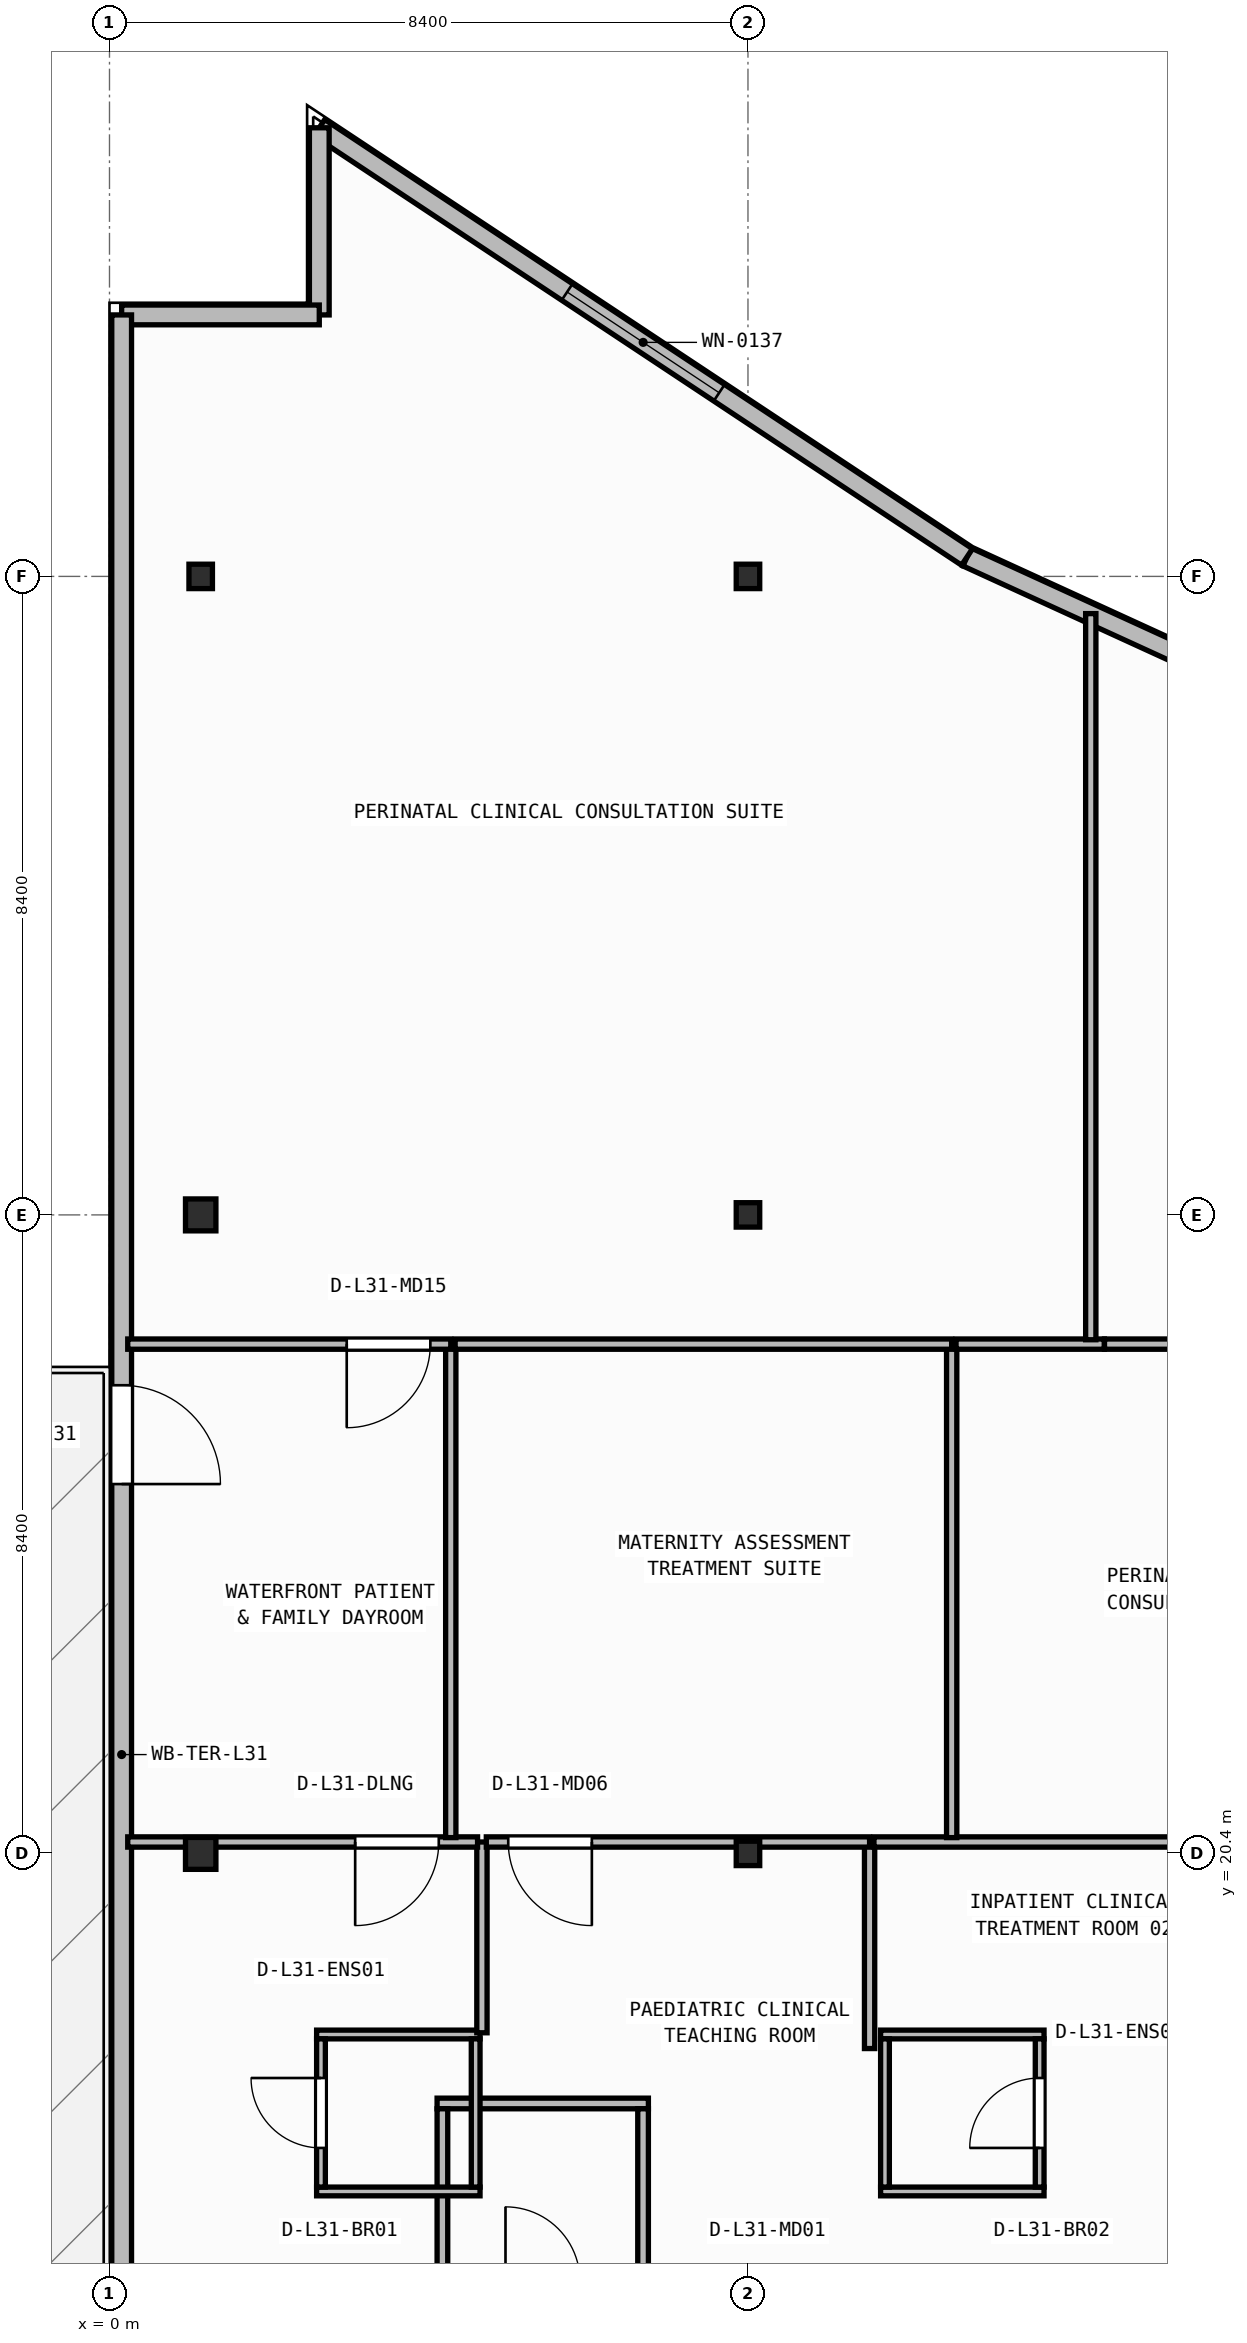
"""IFC4 building model, lengths in metres.
Left out: names, types, materials, properties, quantities, classifications, styles, units other than length and angle.
Written with IfcOpenShell. Run it as: python <this file> out.ifc"""

import sys

from ifc_helpers import new_model, si_unit, direction, frame, frame_2d, origin, origin_2d, place, context, subcontext, project, spatial, rectangle, i_section, extrude, element, fill, save


model = new_model("IFC4")
c1 = context("Model", 3, precision=1e-05, world=origin(), true_north=direction((0.0, 1.0)))
c2 = subcontext(c1, "Body", "Model", "MODEL_VIEW")
j1 = project(units=[si_unit("LENGTHUNIT", "METRE"), si_unit("PLANEANGLEUNIT", "RADIAN")], contexts=[c1])
p1 = place(None, origin())
s1 = spatial("IfcSite", under=j1, at=p1, CompositionType="ELEMENT")
p2 = place(p1, origin())
s2 = spatial("IfcBuilding", under=s1, at=p2, CompositionType="ELEMENT")
p3 = place(p2, frame((0.0, 0.0, 127.05)))
s3 = spatial("IfcBuildingStorey", under=s2, at=p3, CompositionType="ELEMENT", Elevation=127.05)
p4 = place(p3, frame((1.2, 20.4, 0.0), z_axis=(0.0, 0.0, 1.0), x_axis=(1.0, 0.0, 0.0)))
e1 = element("IfcColumn", 1, at=p4, inside=s3, PredefinedType="COLUMN", context=c2, shape_type="SweptSolid", body=[
    extrude(i_section(OverallWidth=0.4, OverallDepth=0.42, WebThickness=0.025, FlangeThickness=0.04, at=origin_2d()), origin(), (0.0, 0.0, 1.0), 3.95),
])
p5 = place(p3, frame((8.4, 20.4, 0.0), z_axis=(0.0, 0.0, 1.0), x_axis=(1.0, 0.0, 0.0)))
e2 = element("IfcColumn", 2, at=p5, inside=s3, PredefinedType="COLUMN", context=c2, shape_type="SweptSolid", body=[
    extrude(i_section(OverallWidth=0.309, OverallDepth=0.321, WebThickness=0.014, FlangeThickness=0.022, FilletRadius=0.017, at=origin_2d()), origin(), (0.0, 0.0, 1.0), 3.95),
])
p6 = place(p3, frame((1.2, 28.8, 0.0), z_axis=(0.0, 0.0, 1.0), x_axis=(1.0, 0.0, 0.0)))
e3 = element("IfcColumn", 3, at=p6, inside=s3, PredefinedType="COLUMN", context=c2, shape_type="SweptSolid", body=[
    extrude(i_section(OverallWidth=0.4, OverallDepth=0.42, WebThickness=0.025, FlangeThickness=0.04, at=origin_2d()), origin(), (0.0, 0.0, 1.0), 3.95),
])
for number, where, z_axis, x_axis in (
    (4, (8.4, 28.8, 0.0), (0.0, 0.0, 1.0), (1.0, 0.0, 0.0)),
    (5, (1.2, 37.2, 0.0), (0.0, 0.0, 1.0), (1.0, 0.0, 0.0)),
    (6, (8.4, 37.2, 0.0), (0.0, 0.0, 1.0), (1.0, 0.0, 0.0)),
):
    element("IfcColumn", number, at=place(p3, frame(where, z_axis=z_axis, x_axis=x_axis)), inside=s3, PredefinedType="COLUMN", context=c2, shape_type="SweptSolid", body=[
        extrude(i_section(OverallWidth=0.309, OverallDepth=0.321, WebThickness=0.014, FlangeThickness=0.022, FilletRadius=0.017, at=origin_2d()), origin(), (0.0, 0.0, 1.0), 3.95),
    ])
p7 = place(p3, frame((23.818, 31.716, 0.0), z_axis=(0.0, 0.0, 1.0), x_axis=(-0.909209527513, 0.416338846471, 0.0)))
e7 = element("IfcWall", 7, at=p7, inside=s3, PredefinedType="STANDARD", context=c2, shape_type="SweptSolid", body=[
    extrude(rectangle(XDim=13.787, YDim=0.26, at=frame_2d((6.894, 0.0))), origin(), (0.0, 0.0, 1.0), 3.71),
])
p8 = place(p7, frame((5.694, 0.0, 0.9)))
e8 = element("IfcOpeningElement", 8, at=p8, cuts=e7, PredefinedType="OPENING", context=c2, shape_type="SweptSolid", body=[
    extrude(rectangle(XDim=2.4, YDim=1.65, at=frame_2d((1.2, 0.825))), frame((0.0, 0.14, 0.0), z_axis=(0.0, -1.0, 0.0), x_axis=(1.0, 0.0, 0.0)), (0.0, 0.0, 1.0), 0.28),
])
p9 = place(p3, frame((11.282, 37.456, 0.0), z_axis=(0.0, 0.0, 1.0), x_axis=(-0.833630474253, 0.552322580017, 0.0)))
e9 = element("IfcWall", 9, at=p9, inside=s3, PredefinedType="STANDARD", context=c2, shape_type="SweptSolid", body=[
    extrude(rectangle(XDim=10.223, YDim=0.26, at=frame_2d((5.111, 0.0))), origin(), (0.0, 0.0, 1.0), 3.71),
])
p10 = place(p9, frame((3.911, 0.0, 0.9)))
e10 = element("IfcOpeningElement", 10, at=p10, cuts=e9, PredefinedType="OPENING", context=c2, shape_type="SweptSolid", body=[
    extrude(rectangle(XDim=2.4, YDim=1.65, at=frame_2d((1.2, 0.825))), frame((0.0, 0.14, 0.0), z_axis=(0.0, -1.0, 0.0), x_axis=(1.0, 0.0, 0.0)), (0.0, 0.0, 1.0), 0.28),
])
p11 = place(p3, frame((2.76, 43.102, 0.0), z_axis=(0.0, 0.0, 1.0), x_axis=(0.0, -1.0, 0.0)))
e11 = element("IfcWall", 11, at=p11, inside=s3, PredefinedType="STANDARD", context=c2, shape_type="SweptSolid", body=[
    extrude(rectangle(XDim=2.462, YDim=0.26, at=frame_2d((1.231, 0.0))), origin(), (0.0, 0.0, 1.0), 3.71),
])
p12 = place(p3, frame((2.76, 40.64, 0.0), z_axis=(0.0, 0.0, 1.0), x_axis=(-1.0, 0.0, 0.0)))
e12 = element("IfcWall", 12, at=p12, inside=s3, PredefinedType="STANDARD", context=c2, shape_type="SweptSolid", body=[
    extrude(rectangle(XDim=2.6, YDim=0.26, at=frame_2d((1.3, 0.0))), origin(), (0.0, 0.0, 1.0), 3.71),
])
p13 = place(p3, frame((0.16, 40.64, 0.0), z_axis=(0.0, 0.0, 1.0), x_axis=(0.0, -1.0, 0.0)))
e13 = element("IfcWall", 13, at=p13, inside=s3, PredefinedType="STANDARD", context=c2, shape_type="SweptSolid", body=[
    extrude(rectangle(XDim=37.88, YDim=0.26, at=frame_2d((18.94, 0.0))), origin(), (0.0, 0.0, 1.0), 3.71),
])
p14 = place(p13, frame((14.081, 0.0, 0.0)))
e14 = element("IfcOpeningElement", 14, at=p14, cuts=e13, PredefinedType="OPENING", context=c2, shape_type="SweptSolid", body=[
    extrude(rectangle(XDim=1.3, YDim=2.15, at=frame_2d((0.65, 1.075))), frame((0.0, 0.14, 0.0), z_axis=(0.0, -1.0, 0.0), x_axis=(1.0, 0.0, 0.0)), (0.0, 0.0, 1.0), 0.28),
])
p15 = place(p3, frame((4.31, 17.11, 0.0), z_axis=(0.0, 0.0, 1.0), x_axis=(1.0, 0.0, 0.0)))
e15 = element("IfcWall", 15, at=p15, inside=s3, PredefinedType="PARTITIONING", context=c2, shape_type="SweptSolid", body=[
    extrude(rectangle(XDim=2.78, YDim=0.14, at=frame_2d((1.39, 0.0))), origin(), (0.0, 0.0, 1.0), 3.71),
])
for number, where, z_axis, x_axis in (
    (16, (4.38, 14.84, 0.0), (0.0, 0.0, 1.0), (0.0, 1.0, 0.0)),
    (17, (7.02, 14.84, 0.0), (0.0, 0.0, 1.0), (0.0, 1.0, 0.0)),
):
    element("IfcWall", number, at=place(p3, frame(where, z_axis=z_axis, x_axis=x_axis)), inside=s3, PredefinedType="PARTITIONING", context=c2, shape_type="SweptSolid", body=[
        extrude(rectangle(XDim=2.2, YDim=0.14, at=frame_2d((1.1, 0.0))), origin(), (0.0, 0.0, 1.0), 3.71),
    ])
for number, where, z_axis, x_axis in (
    (18, (2.725, 15.952, 0.0), (0.0, 0.0, 1.0), (1.0, 0.0, 0.0)),
    (19, (2.725, 18.018, 0.0), (0.0, 0.0, 1.0), (1.0, 0.0, 0.0)),
):
    element("IfcWall", number, at=place(p3, frame(where, z_axis=z_axis, x_axis=x_axis)), inside=s3, PredefinedType="PARTITIONING", context=c2, shape_type="SweptSolid", body=[
        extrude(rectangle(XDim=2.15, YDim=0.115, at=frame_2d((1.075, 0.0))), origin(), (0.0, 0.0, 1.0), 3.71),
    ])
p16 = place(p3, frame((2.782, 16.01, 0.0), z_axis=(0.0, 0.0, 1.0), x_axis=(0.0, 1.0, 0.0)))
e20 = element("IfcWall", 20, at=p16, inside=s3, PredefinedType="PARTITIONING", context=c2, shape_type="SweptSolid", body=[
    extrude(rectangle(XDim=1.95, YDim=0.115, at=frame_2d((0.975, 0.0))), origin(), (0.0, 0.0, 1.0), 3.71),
])
p17 = place(p16, frame((0.515, 0.0, 0.0)))
e21 = element("IfcOpeningElement", 21, at=p17, cuts=e20, PredefinedType="OPENING", context=c2, shape_type="SweptSolid", body=[
    extrude(rectangle(XDim=0.92, YDim=2.1, at=frame_2d((0.46, 1.05))), frame((0.0, 0.067, 0.0), z_axis=(0.0, -1.0, 0.0), x_axis=(1.0, 0.0, 0.0)), (0.0, 0.0, 1.0), 0.135),
])
p18 = place(p3, frame((4.817, 16.01, 0.0), z_axis=(0.0, 0.0, 1.0), x_axis=(0.0, 1.0, 0.0)))
e22 = element("IfcWall", 22, at=p18, inside=s3, PredefinedType="PARTITIONING", context=c2, shape_type="SweptSolid", body=[
    extrude(rectangle(XDim=1.95, YDim=0.115, at=frame_2d((0.975, 0.0))), origin(), (0.0, 0.0, 1.0), 3.71),
])
for number, where, z_axis, x_axis in (
    (23, (10.145, 15.952, 0.0), (0.0, 0.0, 1.0), (1.0, 0.0, 0.0)),
    (24, (10.145, 18.018, 0.0), (0.0, 0.0, 1.0), (1.0, 0.0, 0.0)),
):
    element("IfcWall", number, at=place(p3, frame(where, z_axis=z_axis, x_axis=x_axis)), inside=s3, PredefinedType="PARTITIONING", context=c2, shape_type="SweptSolid", body=[
        extrude(rectangle(XDim=2.15, YDim=0.115, at=frame_2d((1.075, 0.0))), origin(), (0.0, 0.0, 1.0), 3.71),
    ])
p19 = place(p3, frame((10.202, 16.01, 0.0), z_axis=(0.0, 0.0, 1.0), x_axis=(0.0, 1.0, 0.0)))
e25 = element("IfcWall", 25, at=p19, inside=s3, PredefinedType="PARTITIONING", context=c2, shape_type="SweptSolid", body=[
    extrude(rectangle(XDim=1.95, YDim=0.115, at=frame_2d((0.975, 0.0))), origin(), (0.0, 0.0, 1.0), 3.71),
])
p20 = place(p3, frame((12.238, 16.01, 0.0), z_axis=(0.0, 0.0, 1.0), x_axis=(0.0, 1.0, 0.0)))
e26 = element("IfcWall", 26, at=p20, inside=s3, PredefinedType="PARTITIONING", context=c2, shape_type="SweptSolid", body=[
    extrude(rectangle(XDim=1.95, YDim=0.115, at=frame_2d((0.975, 0.0))), origin(), (0.0, 0.0, 1.0), 3.71),
])
p21 = place(p20, frame((0.515, 0.0, 0.0)))
e27 = element("IfcOpeningElement", 27, at=p21, cuts=e26, PredefinedType="OPENING", context=c2, shape_type="SweptSolid", body=[
    extrude(rectangle(XDim=0.92, YDim=2.1, at=frame_2d((0.46, 1.05))), frame((0.0, 0.067, 0.0), z_axis=(0.0, -1.0, 0.0), x_axis=(1.0, 0.0, 0.0)), (0.0, 0.0, 1.0), 0.135),
])
p22 = place(p3, frame((4.9, 18.04, 0.0), z_axis=(0.0, 0.0, 1.0), x_axis=(0.0, 1.0, 0.0)))
e28 = element("IfcWall", 28, at=p22, inside=s3, PredefinedType="PARTITIONING", context=c2, shape_type="SweptSolid", body=[
    extrude(rectangle(XDim=2.51, YDim=0.135, at=frame_2d((1.255, 0.0))), origin(), (0.0, 0.0, 1.0), 3.71),
])
p23 = place(p3, frame((4.843, 20.55, 0.0), z_axis=(0.0, 0.0, 1.0), x_axis=(-1.0, 0.0, 0.0)))
e29 = element("IfcWall", 29, at=p23, inside=s3, PredefinedType="PARTITIONING", context=c2, shape_type="SweptSolid", body=[
    extrude(rectangle(XDim=4.603, YDim=0.135, at=frame_2d((2.301, 0.0))), origin(), (0.0, 0.0, 1.0), 3.083),
])
p24 = place(p23, frame((0.51, 0.0, 0.0)))
e30 = element("IfcOpeningElement", 30, at=p24, cuts=e29, PredefinedType="OPENING", context=c2, shape_type="SweptSolid", body=[
    extrude(rectangle(XDim=1.1, YDim=2.1, at=frame_2d((0.55, 1.05))), frame((0.0, 0.077, 0.0), z_axis=(0.0, -1.0, 0.0), x_axis=(1.0, 0.0, 0.0)), (0.0, 0.0, 1.0), 0.155),
])
p25 = place(p3, frame((10.0, 17.833, 0.0), z_axis=(0.0, 0.0, 1.0), x_axis=(0.0, 1.0, 0.0)))
e31 = element("IfcWall", 31, at=p25, inside=s3, PredefinedType="PARTITIONING", context=c2, shape_type="SweptSolid", body=[
    extrude(rectangle(XDim=2.718, YDim=0.135, at=frame_2d((1.359, 0.0))), origin(), (0.0, 0.0, 1.0), 3.71),
])
p26 = place(p3, frame((10.0, 20.55, 0.0), z_axis=(0.0, 0.0, 1.0), x_axis=(-1.0, 0.0, 0.0)))
e32 = element("IfcWall", 32, at=p26, inside=s3, PredefinedType="PARTITIONING", context=c2, shape_type="SweptSolid", body=[
    extrude(rectangle(XDim=5.042, YDim=0.135, at=frame_2d((2.521, 0.0))), origin(), (0.0, 0.0, 1.0), 3.083),
])
p27 = place(p26, frame((3.654, 0.0, 0.0)))
e33 = element("IfcOpeningElement", 33, at=p27, cuts=e32, PredefinedType="OPENING", context=c2, shape_type="SweptSolid", body=[
    extrude(rectangle(XDim=1.1, YDim=2.1, at=frame_2d((0.55, 1.05))), frame((0.0, 0.077, 0.0), z_axis=(0.0, -1.0, 0.0), x_axis=(1.0, 0.0, 0.0)), (0.0, 0.0, 1.0), 0.155),
])
p28 = place(p3, frame((14.34, 20.55, 0.0), z_axis=(0.0, 0.0, 1.0), x_axis=(-1.0, 0.0, 0.0)))
e34 = element("IfcWall", 34, at=p28, inside=s3, PredefinedType="PARTITIONING", context=c2, shape_type="SweptSolid", body=[
    extrude(rectangle(XDim=4.282, YDim=0.135, at=frame_2d((2.141, 0.0))), origin(), (0.0, 0.0, 1.0), 3.083),
])
p29 = place(p3, frame((4.49, 20.607, 0.0), z_axis=(0.0, 0.0, 1.0), x_axis=(0.0, 1.0, 0.0)))
e35 = element("IfcWall", 35, at=p29, inside=s3, PredefinedType="PARTITIONING", context=c2, shape_type="SweptSolid", body=[
    extrude(rectangle(XDim=6.493, YDim=0.135, at=frame_2d((3.246, 0.0))), origin(), (0.0, 0.0, 1.0), 3.71),
])
p30 = place(p3, frame((4.49, 27.1, 0.0), z_axis=(0.0, 0.0, 1.0), x_axis=(-1.0, 0.0, 0.0)))
e36 = element("IfcWall", 36, at=p30, inside=s3, PredefinedType="PARTITIONING", context=c2, shape_type="SweptSolid", body=[
    extrude(rectangle(XDim=4.25, YDim=0.135, at=frame_2d((2.125, 0.0))), origin(), (0.0, 0.0, 1.0), 3.71),
])
p31 = place(p30, frame((0.269, 0.0, 0.0)))
e37 = element("IfcOpeningElement", 37, at=p31, cuts=e36, PredefinedType="OPENING", context=c2, shape_type="SweptSolid", body=[
    extrude(rectangle(XDim=1.1, YDim=2.1, at=frame_2d((0.55, 1.05))), frame((0.0, 0.077, 0.0), z_axis=(0.0, -1.0, 0.0), x_axis=(1.0, 0.0, 0.0)), (0.0, 0.0, 1.0), 0.155),
])
p32 = place(p3, frame((11.08, 20.607, 0.0), z_axis=(0.0, 0.0, 1.0), x_axis=(0.0, 1.0, 0.0)))
e38 = element("IfcWall", 38, at=p32, inside=s3, PredefinedType="PARTITIONING", context=c2, shape_type="SweptSolid", body=[
    extrude(rectangle(XDim=6.493, YDim=0.135, at=frame_2d((3.246, 0.0))), origin(), (0.0, 0.0, 1.0), 3.71),
])
p33 = place(p3, frame((11.08, 27.1, 0.0), z_axis=(0.0, 0.0, 1.0), x_axis=(-1.0, 0.0, 0.0)))
e39 = element("IfcWall", 39, at=p33, inside=s3, PredefinedType="PARTITIONING", context=c2, shape_type="SweptSolid", body=[
    extrude(rectangle(XDim=6.532, YDim=0.135, at=frame_2d((3.266, 0.0))), origin(), (0.0, 0.0, 1.0), 3.71),
])
p34 = place(p3, frame((13.088, 27.1, 0.0), z_axis=(0.0, 0.0, 1.0), x_axis=(-1.0, 0.0, 0.0)))
e40 = element("IfcWall", 40, at=p34, inside=s3, PredefinedType="PARTITIONING", context=c2, shape_type="SweptSolid", body=[
    extrude(rectangle(XDim=1.951, YDim=0.135, at=frame_2d((0.976, 0.0))), origin(), (0.0, 0.0, 1.0), 3.71),
])
p35 = place(p3, frame((19.12, 27.1, 0.0), z_axis=(0.0, 0.0, 1.0), x_axis=(-1.0, 0.0, 0.0)))
e41 = element("IfcWall", 41, at=p35, inside=s3, PredefinedType="PARTITIONING", context=c2, shape_type="SweptSolid", body=[
    extrude(rectangle(XDim=6.03, YDim=0.135, at=frame_2d((3.015, 0.0))), origin(), (0.0, 0.0, 1.0), 3.71),
])
p36 = place(p3, frame((12.91, 27.157, 0.0), z_axis=(0.0, 0.0, 1.0), x_axis=(0.0, 1.0, 0.0)))
e42 = element("IfcWall", 42, at=p36, inside=s3, PredefinedType="PARTITIONING", context=c2, shape_type="SweptSolid", body=[
    extrude(rectangle(XDim=9.553, YDim=0.135, at=frame_2d((4.776, 0.0))), origin(), (0.0, 0.0, 1.0), 3.71),
])
p37 = place(p10, origin())
e43 = element("IfcWindow", 43, at=p37, inside=s3, PartitioningType="SINGLE_PANEL", PredefinedType="WINDOW", context=c2, shape_type="SweptSolid", body=[
    extrude(rectangle(XDim=2.4, YDim=1.65, at=frame_2d((1.2, 0.825))), frame((0.0, 0.03, 0.0), z_axis=(0.0, -1.0, 0.0), x_axis=(1.0, 0.0, 0.0)), (0.0, 0.0, 1.0), 0.06),
])
fill(e10, e43)
p38 = place(p14, origin())
e44 = element("IfcDoor", 44, at=p38, inside=s3, OperationType="SINGLE_SWING_RIGHT", PredefinedType="DOOR", context=c2, shape_type="SweptSolid", body=[
    extrude(rectangle(XDim=1.3, YDim=2.15, at=frame_2d((0.65, 1.075))), frame((0.0, 0.025, 0.0), z_axis=(0.0, -1.0, 0.0), x_axis=(1.0, 0.0, 0.0)), (0.0, 0.0, 1.0), 0.05),
])
fill(e14, e44)
p39 = place(p17, origin())
e45 = element("IfcDoor", 45, at=p39, inside=s3, OperationType="SINGLE_SWING_RIGHT", PredefinedType="DOOR", context=c2, shape_type="SweptSolid", body=[
    extrude(rectangle(XDim=0.92, YDim=2.1, at=frame_2d((0.46, 1.05))), frame((0.0, 0.025, 0.0), z_axis=(0.0, -1.0, 0.0), x_axis=(1.0, 0.0, 0.0)), (0.0, 0.0, 1.0), 0.05),
])
fill(e21, e45)
p40 = place(p21, origin())
e46 = element("IfcDoor", 46, at=p40, inside=s3, OperationType="SINGLE_SWING_LEFT", PredefinedType="DOOR", context=c2, shape_type="SweptSolid", body=[
    extrude(rectangle(XDim=0.92, YDim=2.1, at=frame_2d((0.46, 1.05))), frame((0.0, 0.025, 0.0), z_axis=(0.0, -1.0, 0.0), x_axis=(1.0, 0.0, 0.0)), (0.0, 0.0, 1.0), 0.05),
])
fill(e27, e46)
p41 = place(p24, origin())
e47 = element("IfcDoor", 47, at=p41, inside=s3, OperationType="SINGLE_SWING_RIGHT", PredefinedType="DOOR", context=c2, shape_type="SweptSolid", body=[
    extrude(rectangle(XDim=1.1, YDim=2.1, at=frame_2d((0.55, 1.05))), frame((0.0, 0.025, 0.0), z_axis=(0.0, -1.0, 0.0), x_axis=(1.0, 0.0, 0.0)), (0.0, 0.0, 1.0), 0.05),
])
fill(e30, e47)
p42 = place(p27, origin())
e48 = element("IfcDoor", 48, at=p42, inside=s3, OperationType="SINGLE_SWING_LEFT", PredefinedType="DOOR", context=c2, shape_type="SweptSolid", body=[
    extrude(rectangle(XDim=1.1, YDim=2.1, at=frame_2d((0.55, 1.05))), frame((0.0, 0.025, 0.0), z_axis=(0.0, -1.0, 0.0), x_axis=(1.0, 0.0, 0.0)), (0.0, 0.0, 1.0), 0.05),
])
fill(e33, e48)
p43 = place(p31, origin())
e49 = element("IfcDoor", 49, at=p43, inside=s3, OperationType="SINGLE_SWING_RIGHT", PredefinedType="DOOR", context=c2, shape_type="SweptSolid", body=[
    extrude(rectangle(XDim=1.1, YDim=2.1, at=frame_2d((0.55, 1.05))), frame((0.0, 0.025, 0.0), z_axis=(0.0, -1.0, 0.0), x_axis=(1.0, 0.0, 0.0)), (0.0, 0.0, 1.0), 0.05),
])
fill(e37, e49)
save(model, sys.argv[1])
